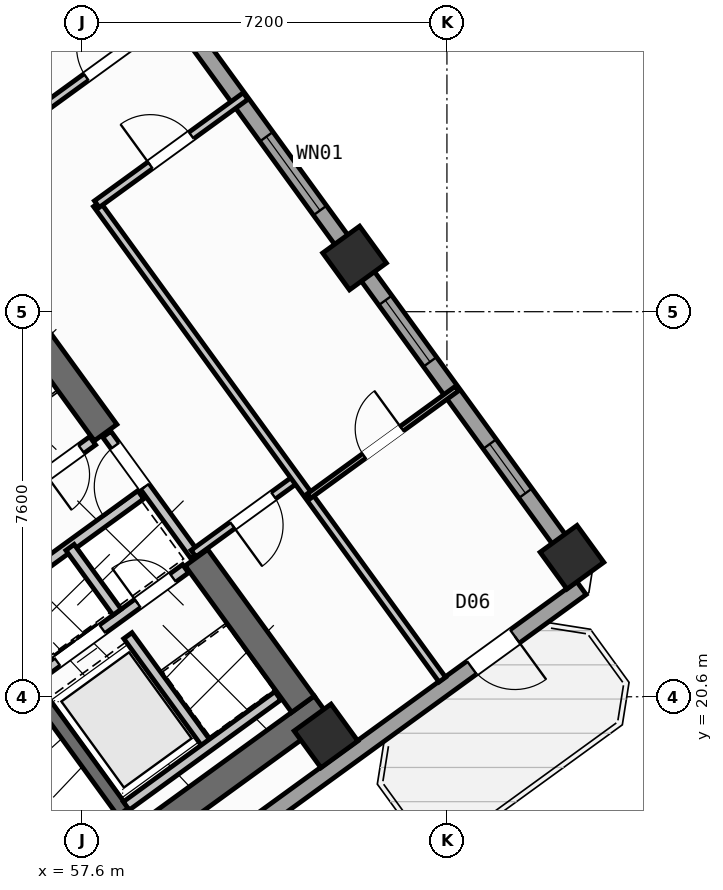
"""IFC4 building model, lengths in metres.
Left out: names, types, materials, properties, quantities, classifications, styles, units other than length and angle.
Written with IfcOpenShell. Run it as: python <this file> out.ifc"""

import sys

from ifc_helpers import new_model, si_unit, direction, frame, frame_2d, origin, origin_2d, place, context, subcontext, project, spatial, rectangle, hollow_rectangle, extrude, source, transform, mapped, element, fill, save


model = new_model("IFC4")
c1 = context("Model", 3, precision=1e-05, world=origin(), true_north=direction((0.0, 1.0)))
c2 = subcontext(c1, "Body", "Model", "MODEL_VIEW")
j1 = project(units=[si_unit("LENGTHUNIT", "METRE"), si_unit("PLANEANGLEUNIT", "RADIAN")], contexts=[c1])
p1 = place(None, origin())
s1 = spatial("IfcSite", under=j1, at=p1, CompositionType="ELEMENT")
p2 = place(p1, origin())
s2 = spatial("IfcBuilding", under=s1, at=p2, CompositionType="ELEMENT")
p3 = place(p2, frame((0.0, 0.0, 105.3)))
s3 = spatial("IfcBuildingStorey", under=s2, at=p3, CompositionType="ELEMENT", Elevation=105.3)
p4 = place(p3, frame((52.359, 13.14, 0.0), z_axis=(0.0, 0.0, 1.0), x_axis=(0.809014896919, 0.587788139183, 0.0)))
e1 = element("IfcWall", 1, at=p4, inside=s3, PredefinedType="SHEAR", context=c2, shape_type="SweptSolid", body=[
    extrude(rectangle(XDim=12.34, YDim=0.55, at=frame_2d((6.17, 0.0))), origin(), (0.0, 0.0, 1.0), 3.35),
])
p5 = place(p3, frame((61.958, 20.454, 0.0), z_axis=(0.0, 0.0, 1.0), x_axis=(-0.587802113096, 0.809004744015, 0.0)))
e2 = element("IfcWall", 2, at=p5, inside=s3, PredefinedType="SHEAR", context=c2, shape_type="SweptSolid", body=[
    extrude(rectangle(XDim=3.575, YDim=0.55, at=frame_2d((1.788, 0.0))), origin(), (0.0, 0.0, 1.0), 3.35),
])
p6 = place(p3, frame((58.064, 25.813, 0.0), z_axis=(0.0, 0.0, 1.0), x_axis=(-0.587764933797, 0.809031756236, 0.0)))
e3 = element("IfcWall", 3, at=p6, inside=s3, PredefinedType="SHEAR", context=c2, shape_type="SweptSolid", body=[
    extrude(rectangle(XDim=6.425, YDim=0.55, at=frame_2d((3.212, 0.0))), origin(), (0.0, 0.0, 1.0), 3.35),
])
m1 = source(origin(), c2, "Body", "SweptSolid", [
    extrude(hollow_rectangle(XDim=0.9, YDim=0.9, WallThickness=0.036, at=origin_2d()), origin(), (0.0, 0.0, 1.0), 3.6),
])
for number, where, z_axis, x_axis in (
    (4, (62.414, 19.827, 0.0), (0.0, 0.0, 1.0), (0.809, 0.588, 0.0)),
    (5, (67.268, 23.354, 0.0), (0.0, 0.0, 1.0), (0.809, 0.588, 0.0)),
    (6, (62.977, 29.259, 0.0), (0.0, 0.0, 1.0), (0.809, 0.588, 0.0)),
):
    element("IfcColumn", number, at=place(p3, frame(where, z_axis=z_axis, x_axis=x_axis)), inside=s3, PredefinedType="COLUMN", context=c2, shape_type="MappedRepresentation", body=[
        mapped(m1, transform((0.0, 0.0, 0.0), scale=1.0)),
    ])
p7 = place(p3, frame((54.81, 40.5, 0.0), z_axis=(0.0, 0.0, 1.0), x_axis=(0.587783625747, -0.809018176127, 0.0)))
e7 = element("IfcWall", 7, at=p7, inside=s3, PredefinedType="STANDARD", context=c2, shape_type="SweptSolid", body=[
    extrude(rectangle(XDim=21.587, YDim=0.32, at=frame_2d((10.794, 0.0))), origin(), (0.0, 0.0, 1.0), 2.775),
])
p8 = place(p7, frame((2.381, 0.0, 0.8)))
e8 = element("IfcOpeningElement", 8, at=p8, cuts=e7, PredefinedType="OPENING", context=c2, shape_type="SweptSolid", body=[
    extrude(rectangle(XDim=2.1, YDim=1.55, at=frame_2d((1.05, 0.775))), frame((0.0, 0.17, 0.0), z_axis=(0.0, -1.0, 0.0), x_axis=(1.0, 0.0, 0.0)), (0.0, 0.0, 1.0), 0.34),
])
p9 = place(p7, frame((10.934, 0.0, 0.85)))
e9 = element("IfcOpeningElement", 9, at=p9, cuts=e7, PredefinedType="OPENING", context=c2, shape_type="SweptSolid", body=[
    extrude(rectangle(XDim=1.8, YDim=1.5, at=frame_2d((0.9, 0.75))), frame((0.0, 0.17, 0.0), z_axis=(0.0, -1.0, 0.0), x_axis=(1.0, 0.0, 0.0)), (0.0, 0.0, 1.0), 0.34),
])
p10 = place(p7, frame((14.927, 0.0, 0.85)))
e10 = element("IfcOpeningElement", 10, at=p10, cuts=e7, PredefinedType="OPENING", context=c2, shape_type="SweptSolid", body=[
    extrude(rectangle(XDim=1.5, YDim=1.5, at=frame_2d((0.75, 0.75))), frame((0.0, 0.17, 0.0), z_axis=(0.0, -1.0, 0.0), x_axis=(1.0, 0.0, 0.0)), (0.0, 0.0, 1.0), 0.34),
])
p11 = place(p7, frame((18.432, 0.0, 0.95)))
e11 = element("IfcOpeningElement", 11, at=p11, cuts=e7, PredefinedType="OPENING", context=c2, shape_type="SweptSolid", body=[
    extrude(rectangle(XDim=1.2, YDim=1.4, at=frame_2d((0.6, 0.7))), frame((0.0, 0.17, 0.0), z_axis=(0.0, -1.0, 0.0), x_axis=(1.0, 0.0, 0.0)), (0.0, 0.0, 1.0), 0.34),
])
p12 = place(p3, frame((67.454, 22.747, 0.0), z_axis=(0.0, 0.0, 1.0), x_axis=(-0.809021120468, -0.587779573171, 0.0)))
e12 = element("IfcWall", 12, at=p12, inside=s3, PredefinedType="STANDARD", context=c2, shape_type="SweptSolid", body=[
    extrude(rectangle(XDim=17.588, YDim=0.32, at=frame_2d((8.794, 0.0))), origin(), (0.0, 0.0, 1.0), 3.35),
])
p13 = place(p12, frame((1.624, 0.0, 0.0)))
e13 = element("IfcOpeningElement", 13, at=p13, cuts=e12, PredefinedType="OPENING", context=c2, shape_type="SweptSolid", body=[
    extrude(rectangle(XDim=1.05, YDim=2.15, at=frame_2d((0.525, 1.075))), frame((0.0, 0.17, 0.0), z_axis=(0.0, -1.0, 0.0), x_axis=(1.0, 0.0, 0.0)), (0.0, 0.0, 1.0), 0.34),
])
p14 = place(p12, frame((8.144, 0.0, 0.8)))
e14 = element("IfcOpeningElement", 14, at=p14, cuts=e12, PredefinedType="OPENING", context=c2, shape_type="SweptSolid", body=[
    extrude(rectangle(XDim=2.1, YDim=1.55, at=frame_2d((1.05, 0.775))), frame((0.0, 0.17, 0.0), z_axis=(0.0, -1.0, 0.0), x_axis=(1.0, 0.0, 0.0)), (0.0, 0.0, 1.0), 0.34),
])
p15 = place(p12, frame((13.344, 0.0, 0.8)))
e15 = element("IfcOpeningElement", 15, at=p15, cuts=e12, PredefinedType="OPENING", context=c2, shape_type="SweptSolid", body=[
    extrude(rectangle(XDim=2.1, YDim=1.55, at=frame_2d((1.05, 0.775))), frame((0.0, 0.17, 0.0), z_axis=(0.0, -1.0, 0.0), x_axis=(1.0, 0.0, 0.0)), (0.0, 0.0, 1.0), 0.34),
])
p16 = place(p3, frame((52.472, 14.013, 0.0), z_axis=(0.0, 0.0, 1.0), x_axis=(0.809028366311, 0.587769599847, 0.0)))
e16 = element("IfcWall", 16, at=p16, inside=s3, PredefinedType="SHEAR", context=c2, shape_type="SweptSolid", body=[
    extrude(rectangle(XDim=7.33, YDim=0.26, at=frame_2d((3.665, 0.0))), origin(), (0.0, 0.0, 1.0), 3.35),
])
p17 = place(p3, frame((58.41, 18.327, 0.0), z_axis=(0.0, 0.0, 1.0), x_axis=(-0.58776738483, 0.809029975545, 0.0)))
e17 = element("IfcWall", 17, at=p17, inside=s3, PredefinedType="SHEAR", context=c2, shape_type="SweptSolid", body=[
    extrude(rectangle(XDim=3.16, YDim=0.26, at=frame_2d((1.58, 0.0))), origin(), (0.0, 0.0, 1.0), 3.35),
])
p18 = place(p3, frame((56.553, 20.884, 0.0), z_axis=(0.0, 0.0, 1.0), x_axis=(0.809023564264, 0.58777620951, 0.0)))
e18 = element("IfcWall", 18, at=p18, inside=s3, PredefinedType="STANDARD", context=c2, shape_type="SweptSolid", body=[
    extrude(rectangle(XDim=3.818, YDim=0.2, at=frame_2d((1.909, 0.0))), origin(), (0.0, 0.0, 1.0), 3.34),
])
p19 = place(p18, frame((0.69, 0.0, 0.0)))
e19 = element("IfcOpeningElement", 19, at=p19, cuts=e18, PredefinedType="OPENING", context=c2, shape_type="SweptSolid", body=[
    extrude(rectangle(XDim=1.1, YDim=2.15, at=frame_2d((0.55, 1.075))), frame((0.0, 0.11, 0.0), z_axis=(0.0, -1.0, 0.0), x_axis=(1.0, 0.0, 0.0)), (0.0, 0.0, 1.0), 0.22),
])
p20 = place(p18, frame((2.65, 0.0, 0.0)))
e20 = element("IfcOpeningElement", 20, at=p20, cuts=e18, PredefinedType="OPENING", context=c2, shape_type="SweptSolid", body=[
    extrude(rectangle(XDim=0.86, YDim=2.05, at=frame_2d((0.43, 1.025))), frame((0.0, 0.11, 0.0), z_axis=(0.0, -1.0, 0.0), x_axis=(1.0, 0.0, 0.0)), (0.0, 0.0, 1.0), 0.22),
])
p21 = place(p3, frame((54.421, 21.436, 0.0), z_axis=(0.0, 0.0, 1.0), x_axis=(0.809013710463, 0.587789772183, 0.0)))
e21 = element("IfcWall", 21, at=p21, inside=s3, PredefinedType="STANDARD", context=c2, shape_type="SweptSolid", body=[
    extrude(rectangle(XDim=5.36, YDim=0.2, at=frame_2d((2.68, 0.0))), origin(), (0.0, 0.0, 1.0), 3.34),
])
p22 = place(p3, frame((58.29, 22.27, 0.0), z_axis=(0.0, 0.0, 1.0), x_axis=(-0.587840865826, 0.808976585857, 0.0)))
e22 = element("IfcWall", 22, at=p22, inside=s3, PredefinedType="STANDARD", context=c2, shape_type="SweptSolid", body=[
    extrude(rectangle(XDim=1.58, YDim=0.2, at=frame_2d((0.79, 0.0))), origin(), (0.0, 0.0, 1.0), 3.34),
])
p23 = place(p3, frame((60.067, 19.655, 0.0), z_axis=(0.0, 0.0, 1.0), x_axis=(-0.587800520745, 0.809005900975, 0.0)))
e23 = element("IfcWall", 23, at=p23, inside=s3, PredefinedType="STANDARD", context=c2, shape_type="SweptSolid", body=[
    extrude(rectangle(XDim=2.66, YDim=0.2, at=frame_2d((1.33, 0.0))), origin(), (0.0, 0.0, 1.0), 3.34),
])
p24 = place(p3, frame((58.472, 18.447, 0.0), z_axis=(0.0, 0.0, 1.0), x_axis=(0.809018631237, 0.587782999339, 0.0)))
e24 = element("IfcWall", 24, at=p24, inside=s3, PredefinedType="STANDARD", context=c2, shape_type="SweptSolid", body=[
    extrude(rectangle(XDim=3.698, YDim=0.2, at=frame_2d((1.849, 0.0))), origin(), (0.0, 0.0, 1.0), 3.34),
])
p25 = place(p3, frame((53.425, 22.468, 0.0), z_axis=(0.0, 0.0, 1.0), x_axis=(0.809024377198, 0.587775090574, 0.0)))
e25 = element("IfcWall", 25, at=p25, inside=s3, PredefinedType="STANDARD", context=c2, shape_type="SweptSolid", body=[
    extrude(rectangle(XDim=5.418, YDim=0.2, at=frame_2d((2.709, 0.0))), origin(), (0.0, 0.0, 1.0), 3.34),
])
p26 = place(p25, frame((4.28, 0.0, 0.0)))
e26 = element("IfcOpeningElement", 26, at=p26, cuts=e25, PredefinedType="OPENING", context=c2, shape_type="SweptSolid", body=[
    extrude(rectangle(XDim=0.86, YDim=2.05, at=frame_2d((0.43, 1.025))), frame((0.0, 0.11, 0.0), z_axis=(0.0, -1.0, 0.0), x_axis=(1.0, 0.0, 0.0)), (0.0, 0.0, 1.0), 0.22),
])
p27 = place(p25, frame((0.35, 0.0, 0.0)))
e27 = element("IfcOpeningElement", 27, at=p27, cuts=e25, PredefinedType="OPENING", context=c2, shape_type="SweptSolid", body=[
    extrude(rectangle(XDim=0.86, YDim=2.05, at=frame_2d((0.43, 1.025))), frame((0.0, 0.11, 0.0), z_axis=(0.0, -1.0, 0.0), x_axis=(1.0, 0.0, 0.0)), (0.0, 0.0, 1.0), 0.22),
])
p28 = place(p3, frame((59.827, 23.386, 0.0), z_axis=(0.0, 0.0, 1.0), x_axis=(-0.587803840107, 0.809003489211, 0.0)))
e28 = element("IfcWall", 28, at=p28, inside=s3, PredefinedType="STANDARD", context=c2, shape_type="SweptSolid", body=[
    extrude(rectangle(XDim=2.96, YDim=0.2, at=frame_2d((1.48, 0.0))), origin(), (0.0, 0.0, 1.0), 3.34),
])
p29 = place(p28, frame((1.68, 0.0, 0.0)))
e29 = element("IfcOpeningElement", 29, at=p29, cuts=e28, PredefinedType="OPENING", context=c2, shape_type="SweptSolid", body=[
    extrude(rectangle(XDim=1.0, YDim=2.1, at=frame_2d((0.5, 1.05))), frame((0.0, 0.11, 0.0), z_axis=(0.0, -1.0, 0.0), x_axis=(1.0, 0.0, 0.0)), (0.0, 0.0, 1.0), 0.22),
])
p30 = place(p3, frame((59.798, 23.427, 0.0), z_axis=(0.0, 0.0, 1.0), x_axis=(0.809034604122, 0.587761013791, 0.0)))
e30 = element("IfcWall", 30, at=p30, inside=s3, PredefinedType="PARTITIONING", context=c2, shape_type="SweptSolid", body=[
    extrude(rectangle(XDim=2.51, YDim=0.16, at=frame_2d((1.255, 0.0))), origin(), (0.0, 0.0, 1.0), 3.34),
])
p31 = place(p30, frame((0.95, 0.0, 0.0)))
e31 = element("IfcOpeningElement", 31, at=p31, cuts=e30, PredefinedType="OPENING", context=c2, shape_type="SweptSolid", body=[
    extrude(rectangle(XDim=1.0, YDim=2.1, at=frame_2d((0.5, 1.05))), frame((0.0, 0.09, 0.0), z_axis=(0.0, -1.0, 0.0), x_axis=(1.0, 0.0, 0.0)), (0.0, 0.0, 1.0), 0.18),
])
p32 = place(p3, frame((64.709, 20.938, 0.0), z_axis=(0.0, 0.0, 1.0), x_axis=(-0.587781191743, 0.809019944521, 0.0)))
e32 = element("IfcWall", 32, at=p32, inside=s3, PredefinedType="PARTITIONING", context=c2, shape_type="SweptSolid", body=[
    extrude(rectangle(XDim=11.6, YDim=0.16, at=frame_2d((5.8, 0.0))), origin(), (0.0, 0.0, 1.0), 3.34),
])
p33 = place(p3, frame((57.89, 30.323, 0.0), z_axis=(0.0, 0.0, 1.0), x_axis=(0.809035546126, 0.58775971715, 0.0)))
e33 = element("IfcWall", 33, at=p33, inside=s3, PredefinedType="PARTITIONING", context=c2, shape_type="SweptSolid", body=[
    extrude(rectangle(XDim=3.63, YDim=0.16, at=frame_2d((1.815, 0.0))), origin(), (0.0, 0.0, 1.0), 3.34),
])
p34 = place(p33, frame((1.305, 0.0, 0.0)))
e34 = element("IfcOpeningElement", 34, at=p34, cuts=e33, PredefinedType="OPENING", context=c2, shape_type="SweptSolid", body=[
    extrude(rectangle(XDim=1.0, YDim=2.1, at=frame_2d((0.5, 1.05))), frame((0.0, 0.09, 0.0), z_axis=(0.0, -1.0, 0.0), x_axis=(1.0, 0.0, 0.0)), (0.0, 0.0, 1.0), 0.18),
])
p35 = place(p3, frame((56.627, 32.062, 0.0), z_axis=(0.0, 0.0, 1.0), x_axis=(0.809003564202, 0.587803736896, 0.0)))
e35 = element("IfcWall", 35, at=p35, inside=s3, PredefinedType="PARTITIONING", context=c2, shape_type="SweptSolid", body=[
    extrude(rectangle(XDim=3.63, YDim=0.16, at=frame_2d((1.815, 0.0))), origin(), (0.0, 0.0, 1.0), 3.34),
])
p36 = place(p35, frame((1.305, 0.0, 0.0)))
e36 = element("IfcOpeningElement", 36, at=p36, cuts=e35, PredefinedType="OPENING", context=c2, shape_type="SweptSolid", body=[
    extrude(rectangle(XDim=1.0, YDim=2.1, at=frame_2d((0.5, 1.05))), frame((0.0, 0.09, 0.0), z_axis=(0.0, -1.0, 0.0), x_axis=(1.0, 0.0, 0.0)), (0.0, 0.0, 1.0), 0.18),
])
p37 = place(p3, frame((62.077, 24.561, 0.0), z_axis=(0.0, 0.0, 1.0), x_axis=(0.809005039917, 0.58780170584, 0.0)))
e37 = element("IfcWall", 37, at=p37, inside=s3, PredefinedType="PARTITIONING", context=c2, shape_type="SweptSolid", body=[
    extrude(rectangle(XDim=3.61, YDim=0.11, at=frame_2d((1.805, 0.0))), origin(), (0.0, 0.0, 1.0), 3.34),
])
p38 = place(p37, frame((1.345, 0.0, 0.0)))
e38 = element("IfcOpeningElement", 38, at=p38, cuts=e37, PredefinedType="OPENING", context=c2, shape_type="SweptSolid", body=[
    extrude(rectangle(XDim=0.92, YDim=2.08, at=frame_2d((0.46, 1.04))), frame((0.0, 0.065, 0.0), z_axis=(0.0, -1.0, 0.0), x_axis=(1.0, 0.0, 0.0)), (0.0, 0.0, 1.0), 0.13),
])
m2 = source(origin(), c2, "Body", "SweptSolid", [
    extrude(rectangle(XDim=1.05, YDim=2.15, at=frame_2d((0.525, 1.075))), frame((0.0, 0.025, 0.0), z_axis=(0.0, -1.0, 0.0), x_axis=(1.0, 0.0, 0.0)), (0.0, 0.0, 1.0), 0.05),
])
p39 = place(p13, origin())
e39 = element("IfcDoor", 39, at=p39, inside=s3, OperationType="SINGLE_SWING_LEFT", PredefinedType="DOOR", context=c2, shape_type="MappedRepresentation", body=[
    mapped(m2, transform((0.0, 0.0, 0.0), scale=1.0)),
])
fill(e13, e39)
m3 = source(origin(), c2, "Body", "SweptSolid", [
    extrude(rectangle(XDim=1.8, YDim=1.5, at=frame_2d((0.9, 0.75))), frame((0.0, 0.03, 0.0), z_axis=(0.0, -1.0, 0.0), x_axis=(1.0, 0.0, 0.0)), (0.0, 0.0, 1.0), 0.06),
])
p40 = place(p9, origin())
e40 = element("IfcWindow", 40, at=p40, inside=s3, PartitioningType="SINGLE_PANEL", PredefinedType="WINDOW", context=c2, shape_type="MappedRepresentation", body=[
    mapped(m3, transform((0.0, 0.0, 0.0), scale=1.0)),
])
fill(e9, e40)
m4 = source(origin(), c2, "Body", "SweptSolid", [
    extrude(rectangle(XDim=1.5, YDim=1.5, at=frame_2d((0.75, 0.75))), frame((0.0, 0.03, 0.0), z_axis=(0.0, -1.0, 0.0), x_axis=(1.0, 0.0, 0.0)), (0.0, 0.0, 1.0), 0.06),
])
p41 = place(p10, origin())
e41 = element("IfcWindow", 41, at=p41, inside=s3, PartitioningType="SINGLE_PANEL", PredefinedType="WINDOW", context=c2, shape_type="MappedRepresentation", body=[
    mapped(m4, transform((0.0, 0.0, 0.0), scale=1.0)),
])
fill(e10, e41)
m5 = source(origin(), c2, "Body", "SweptSolid", [
    extrude(rectangle(XDim=1.2, YDim=1.4, at=frame_2d((0.6, 0.7))), frame((0.0, 0.03, 0.0), z_axis=(0.0, -1.0, 0.0), x_axis=(1.0, 0.0, 0.0)), (0.0, 0.0, 1.0), 0.06),
])
p42 = place(p11, origin())
e42 = element("IfcWindow", 42, at=p42, inside=s3, PartitioningType="SINGLE_PANEL", PredefinedType="WINDOW", context=c2, shape_type="MappedRepresentation", body=[
    mapped(m5, transform((0.0, 0.0, 0.0), scale=1.0)),
])
fill(e11, e42)
m6 = source(origin(), c2, "Body", "SweptSolid", [
    extrude(rectangle(XDim=1.1, YDim=2.15, at=frame_2d((0.55, 1.075))), frame((0.0, 0.025, 0.0), z_axis=(0.0, -1.0, 0.0), x_axis=(1.0, 0.0, 0.0)), (0.0, 0.0, 1.0), 0.05),
])
p43 = place(p19, origin())
e43 = element("IfcDoor", 43, at=p43, inside=s3, OperationType="DOUBLE_DOOR_SLIDING", PredefinedType="DOOR", context=c2, shape_type="MappedRepresentation", body=[
    mapped(m6, transform((0.0, 0.0, 0.0), scale=1.0)),
])
fill(e19, e43)
m7 = source(origin(), c2, "Body", "SweptSolid", [
    extrude(rectangle(XDim=0.86, YDim=2.05, at=frame_2d((0.43, 1.025))), frame((0.0, 0.025, 0.0), z_axis=(0.0, -1.0, 0.0), x_axis=(1.0, 0.0, 0.0)), (0.0, 0.0, 1.0), 0.05),
])
p44 = place(p20, origin())
e44 = element("IfcDoor", 44, at=p44, inside=s3, OperationType="SINGLE_SWING_LEFT", PredefinedType="DOOR", context=c2, shape_type="MappedRepresentation", body=[
    mapped(m7, transform((0.0, 0.0, 0.0), scale=1.0)),
])
fill(e20, e44)
p45 = place(p26, frame((0.86, 0.0, 0.0), z_axis=(0.0, 0.0, 1.0), x_axis=(-1.0, 0.0, 0.0)))
e45 = element("IfcDoor", 45, at=p45, inside=s3, OperationType="SINGLE_SWING_RIGHT", PredefinedType="DOOR", context=c2, shape_type="MappedRepresentation", body=[
    mapped(m7, transform((0.0, 0.0, 0.0), scale=1.0)),
])
fill(e26, e45)
m8 = source(origin(), c2, "Body", "SweptSolid", [
    extrude(rectangle(XDim=1.0, YDim=2.1, at=frame_2d((0.5, 1.05))), frame((0.0, 0.025, 0.0), z_axis=(0.0, -1.0, 0.0), x_axis=(1.0, 0.0, 0.0)), (0.0, 0.0, 1.0), 0.05),
])
p46 = place(p31, frame((1.0, 0.0, 0.0), z_axis=(0.0, 0.0, 1.0), x_axis=(-1.0, 0.0, 0.0)))
e46 = element("IfcDoor", 46, at=p46, inside=s3, OperationType="SINGLE_SWING_RIGHT", PredefinedType="DOOR", context=c2, shape_type="MappedRepresentation", body=[
    mapped(m8, transform((0.0, 0.0, 0.0), scale=1.0)),
])
fill(e31, e46)
p47 = place(p29, origin())
e47 = element("IfcDoor", 47, at=p47, inside=s3, OperationType="SINGLE_SWING_LEFT", PredefinedType="DOOR", context=c2, shape_type="MappedRepresentation", body=[
    mapped(m8, transform((0.0, 0.0, 0.0), scale=1.0)),
])
fill(e29, e47)
p48 = place(p36, origin())
e48 = element("IfcDoor", 48, at=p48, inside=s3, OperationType="SINGLE_SWING_RIGHT", PredefinedType="DOOR", context=c2, shape_type="MappedRepresentation", body=[
    mapped(m8, transform((0.0, 0.0, 0.0), scale=1.0)),
])
fill(e36, e48)
p49 = place(p34, origin())
e49 = element("IfcDoor", 49, at=p49, inside=s3, OperationType="SINGLE_SWING_LEFT", PredefinedType="DOOR", context=c2, shape_type="MappedRepresentation", body=[
    mapped(m8, transform((0.0, 0.0, 0.0), scale=1.0)),
])
fill(e34, e49)
m9 = source(origin(), c2, "Body", "SweptSolid", [
    extrude(rectangle(XDim=0.92, YDim=2.08, at=frame_2d((0.46, 1.04))), frame((0.0, 0.025, 0.0), z_axis=(0.0, -1.0, 0.0), x_axis=(1.0, 0.0, 0.0)), (0.0, 0.0, 1.0), 0.05),
])
p50 = place(p38, origin())
e50 = element("IfcDoor", 50, at=p50, inside=s3, OperationType="SINGLE_SWING_RIGHT", PredefinedType="DOOR", context=c2, shape_type="MappedRepresentation", body=[
    mapped(m9, transform((0.0, 0.0, 0.0), scale=1.0)),
])
fill(e38, e50)
save(model, sys.argv[1])
